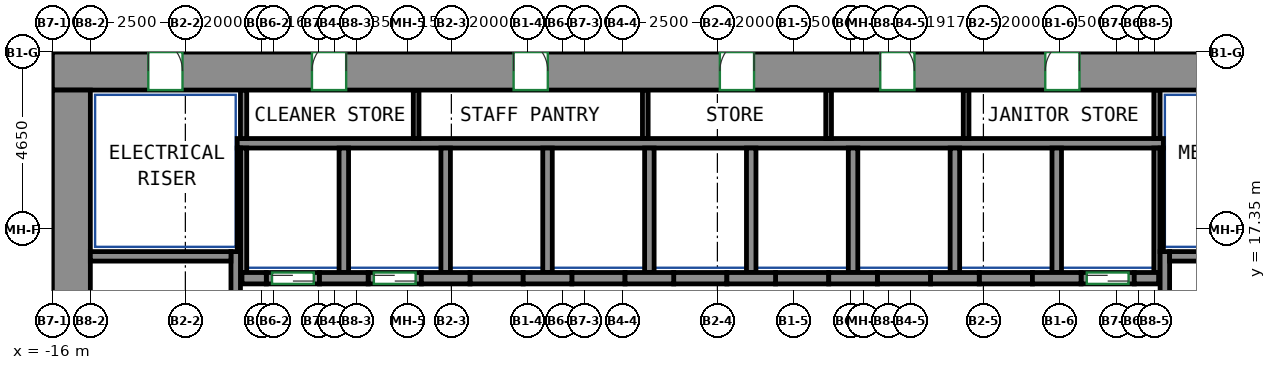
"""IFC4 building model, lengths in metres.
Left out: names, types, materials, properties, quantities, classifications, styles, units other than length and angle.
Written with IfcOpenShell. Run it as: python <this file> out.ifc"""

import sys

from ifc_helpers import new_model, si_unit, direction, frame, frame_2d, origin, place, context, subcontext, project, spatial, rectangle, extrude, source, transform, mapped, element, fill, save


model = new_model("IFC4")
c1 = context("Model", 3, precision=1e-05, world=origin(), true_north=direction((0.0, 1.0)))
c2 = subcontext(c1, "Body", "Model", "MODEL_VIEW")
j1 = project(units=[si_unit("LENGTHUNIT", "METRE"), si_unit("PLANEANGLEUNIT", "RADIAN")], contexts=[c1])
p1 = place(None, origin())
s1 = spatial("IfcSite", under=j1, at=p1, CompositionType="ELEMENT")
p2 = place(p1, origin())
s2 = spatial("IfcBuilding", under=s1, at=p2, CompositionType="ELEMENT")
p3 = place(p2, frame((0.0, 0.0, 59.0)))
s3 = spatial("IfcBuildingStorey", under=s2, at=p3, CompositionType="ELEMENT", Elevation=59.0)
m1 = source(origin(), c2, "Body", "SweptSolid", [
    extrude(rectangle(XDim=34.1, YDim=1.0, at=frame_2d((17.05, 0.0))), origin(), (0.0, 0.0, 1.0), 3.8),
])
p4 = place(p3, frame((-16.0, 21.5, 0.0), z_axis=(0.0, 0.0, 1.0), x_axis=(1.0, 0.0, 0.0)))
e1 = element("IfcWall", 1, at=p4, inside=s3, PredefinedType="SHEAR", context=c2, shape_type="MappedRepresentation", body=[
    mapped(m1, transform((0.0, 0.0, 0.0))),
])
p5 = place(p4, frame((6.831, 0.0, 0.0)))
e2 = element("IfcOpeningElement", 2, at=p5, cuts=e1, PredefinedType="OPENING", context=c2, shape_type="SweptSolid", body=[
    extrude(rectangle(XDim=0.9, YDim=2.1, at=frame_2d((0.45, 1.05))), frame((0.0, 0.51, 0.0), z_axis=(0.0, -1.0, 0.0), x_axis=(1.0, 0.0, 0.0)), (0.0, 0.0, 1.0), 1.02),
])
p6 = place(p4, frame((12.138, 0.0, 0.0)))
e3 = element("IfcOpeningElement", 3, at=p6, cuts=e1, PredefinedType="OPENING", context=c2, shape_type="SweptSolid", body=[
    extrude(rectangle(XDim=0.9, YDim=2.1, at=frame_2d((0.45, 1.05))), frame((0.0, 0.51, 0.0), z_axis=(0.0, -1.0, 0.0), x_axis=(1.0, 0.0, 0.0)), (0.0, 0.0, 1.0), 1.02),
])
p7 = place(p4, frame((17.565, 0.0, 0.0)))
e4 = element("IfcOpeningElement", 4, at=p7, cuts=e1, PredefinedType="OPENING", context=c2, shape_type="SweptSolid", body=[
    extrude(rectangle(XDim=0.9, YDim=2.1, at=frame_2d((0.45, 1.05))), frame((0.0, 0.51, 0.0), z_axis=(0.0, -1.0, 0.0), x_axis=(1.0, 0.0, 0.0)), (0.0, 0.0, 1.0), 1.02),
])
p8 = place(p4, frame((21.786, 0.0, 0.0)))
e5 = element("IfcOpeningElement", 5, at=p8, cuts=e1, PredefinedType="OPENING", context=c2, shape_type="SweptSolid", body=[
    extrude(rectangle(XDim=0.9, YDim=2.1, at=frame_2d((0.45, 1.05))), frame((0.0, 0.51, 0.0), z_axis=(0.0, -1.0, 0.0), x_axis=(1.0, 0.0, 0.0)), (0.0, 0.0, 1.0), 1.02),
])
p9 = place(p4, frame((26.127, 0.0, 0.0)))
e6 = element("IfcOpeningElement", 6, at=p9, cuts=e1, PredefinedType="OPENING", context=c2, shape_type="SweptSolid", body=[
    extrude(rectangle(XDim=0.9, YDim=2.1, at=frame_2d((0.45, 1.05))), frame((0.0, 0.51, 0.0), z_axis=(0.0, -1.0, 0.0), x_axis=(1.0, 0.0, 0.0)), (0.0, 0.0, 1.0), 1.02),
])
p10 = place(p4, frame((2.525, 0.0, 0.0)))
e7 = element("IfcOpeningElement", 7, at=p10, cuts=e1, PredefinedType="OPENING", context=c2, shape_type="SweptSolid", body=[
    extrude(rectangle(XDim=0.9, YDim=2.1, at=frame_2d((0.45, 1.05))), frame((0.0, 0.51, 0.0), z_axis=(0.0, -1.0, 0.0), x_axis=(1.0, 0.0, 0.0)), (0.0, 0.0, 1.0), 1.02),
])
p11 = place(p4, frame((30.675, 0.0, 0.0)))
e8 = element("IfcOpeningElement", 8, at=p11, cuts=e1, PredefinedType="OPENING", context=c2, shape_type="SweptSolid", body=[
    extrude(rectangle(XDim=0.9, YDim=2.1, at=frame_2d((0.45, 1.05))), frame((0.0, 0.51, 0.0), z_axis=(0.0, -1.0, 0.0), x_axis=(1.0, 0.0, 0.0)), (0.0, 0.0, 1.0), 1.02),
])
m2 = source(origin(), c2, "Body", "SweptSolid", [
    extrude(rectangle(XDim=12.0, YDim=1.0, at=frame_2d((6.0, 0.0))), origin(), (0.0, 0.0, 1.0), 3.8),
])
p12 = place(p3, frame((-15.5, 9.0, 0.0), z_axis=(0.0, 0.0, 1.0), x_axis=(0.0, 1.0, 0.0)))
e9 = element("IfcWall", 9, at=p12, inside=s3, PredefinedType="SHEAR", context=c2, shape_type="MappedRepresentation", body=[
    mapped(m2, transform((0.0, 0.0, 0.0))),
])
m3 = source(origin(), c2, "Body", "SweptSolid", [
    extrude(rectangle(XDim=7.75, YDim=0.25, at=frame_2d((3.875, 0.0))), origin(), (0.0, 0.0, 1.0), 3.8),
])
p13 = place(p3, frame((-11.175, 9.0, 0.0), z_axis=(0.0, 0.0, 1.0), x_axis=(0.0, 1.0, 0.0)))
e10 = element("IfcWall", 10, at=p13, inside=s3, PredefinedType="SHEAR", context=c2, shape_type="MappedRepresentation", body=[
    mapped(m3, transform((0.0, 0.0, 0.0))),
])
m4 = source(origin(), c2, "Body", "SweptSolid", [
    extrude(rectangle(XDim=3.7, YDim=0.25, at=frame_2d((1.85, 0.0))), origin(), (0.0, 0.0, 1.0), 3.8),
])
p14 = place(p3, frame((-15.0, 16.625, 0.0), z_axis=(0.0, 0.0, 1.0), x_axis=(1.0, 0.0, 0.0)))
e11 = element("IfcWall", 11, at=p14, inside=s3, PredefinedType="SHEAR", context=c2, shape_type="MappedRepresentation", body=[
    mapped(m4, transform((0.0, 0.0, 0.0))),
])
p15 = place(p3, frame((13.275, 9.0, 0.0), z_axis=(0.0, 0.0, 1.0), x_axis=(0.0, 1.0, 0.0)))
e12 = element("IfcWall", 12, at=p15, inside=s3, PredefinedType="SHEAR", context=c2, shape_type="MappedRepresentation", body=[
    mapped(m3, transform((0.0, 0.0, 0.0))),
])
m5 = source(origin(), c2, "Body", "SweptSolid", [
    extrude(rectangle(XDim=3.7, YDim=0.25, at=frame_2d((1.85, 0.0))), origin(), (0.0, 0.0, 1.0), 3.8),
])
p16 = place(p3, frame((13.4, 16.625, 0.0), z_axis=(0.0, 0.0, 1.0), x_axis=(1.0, 0.0, 0.0)))
e13 = element("IfcWall", 13, at=p16, inside=s3, PredefinedType="SHEAR", context=c2, shape_type="MappedRepresentation", body=[
    mapped(m5, transform((0.0, 0.0, 0.0))),
])
m6 = source(origin(), c2, "Body", "SweptSolid", [
    extrude(rectangle(XDim=0.64, YDim=0.3, at=frame_2d((0.32, 0.0))), origin(), (0.0, 0.0, 1.0), 3.8),
])
p17 = place(p3, frame((-11.01, 16.05, 0.0), z_axis=(0.0, 0.0, 1.0), x_axis=(1.0, 0.0, 0.0)))
e14 = element("IfcWall", 14, at=p17, inside=s3, PredefinedType="SHEAR", context=c2, shape_type="MappedRepresentation", body=[
    mapped(m6, transform((0.0, 0.0, 0.0))),
])
m7 = source(origin(), c2, "Body", "SweptSolid", [
    extrude(rectangle(XDim=1.28, YDim=0.3, at=frame_2d((0.64, 0.0))), origin(), (0.0, 0.0, 1.0), 3.8),
])
for number, where, z_axis, x_axis in (
    (15, (-8.97, 16.05, 0.0), (0.0, 0.0, 1.0), (1.0, 0.0, 0.0)),
    (16, (-6.29, 16.05, 0.0), (0.0, 0.0, 1.0), (1.0, 0.0, 0.0)),
    (17, (-3.61, 16.05, 0.0), (0.0, 0.0, 1.0), (1.0, 0.0, 0.0)),
    (18, (-0.93, 16.05, 0.0), (0.0, 0.0, 1.0), (1.0, 0.0, 0.0)),
    (19, (1.75, 16.05, 0.0), (0.0, 0.0, 1.0), (1.0, 0.0, 0.0)),
    (20, (4.43, 16.05, 0.0), (0.0, 0.0, 1.0), (1.0, 0.0, 0.0)),
):
    element("IfcWall", number, at=place(p3, frame(where, z_axis=z_axis, x_axis=x_axis)), inside=s3, PredefinedType="SHEAR", context=c2, shape_type="MappedRepresentation", body=[
        mapped(m7, transform((0.0, 0.0, 0.0))),
    ])
m8 = source(origin(), c2, "Body", "SweptSolid", [
    extrude(rectangle(XDim=1.28, YDim=0.3, at=frame_2d((0.64, 0.0))), origin(), (0.0, 0.0, 1.0), 3.8),
])
p18 = place(p3, frame((7.11, 16.05, 0.0), z_axis=(0.0, 0.0, 1.0), x_axis=(1.0, 0.0, 0.0)))
e21 = element("IfcWall", 21, at=p18, inside=s3, PredefinedType="SHEAR", context=c2, shape_type="MappedRepresentation", body=[
    mapped(m8, transform((0.0, 0.0, 0.0))),
])
p19 = place(p3, frame((9.79, 16.05, 0.0), z_axis=(0.0, 0.0, 1.0), x_axis=(1.0, 0.0, 0.0)))
e22 = element("IfcWall", 22, at=p19, inside=s3, PredefinedType="SHEAR", context=c2, shape_type="MappedRepresentation", body=[
    mapped(m7, transform((0.0, 0.0, 0.0))),
])
m9 = source(origin(), c2, "Body", "SweptSolid", [
    extrude(rectangle(XDim=0.64, YDim=0.3, at=frame_2d((0.32, 0.0))), origin(), (0.0, 0.0, 1.0), 3.8),
])
p20 = place(p3, frame((12.47, 16.05, 0.0), z_axis=(0.0, 0.0, 1.0), x_axis=(1.0, 0.0, 0.0)))
e23 = element("IfcWall", 23, at=p20, inside=s3, PredefinedType="SHEAR", context=c2, shape_type="MappedRepresentation", body=[
    mapped(m9, transform((0.0, 0.0, 0.0))),
])
m10 = source(origin(), c2, "Body", "SweptSolid", [
    extrude(rectangle(XDim=1.4, YDim=0.3, at=frame_2d((0.7, 0.0))), origin(), (0.0, 0.0, 1.0), 3.8),
])
p21 = place(p3, frame((11.07, 16.05, 0.0), z_axis=(0.0, 0.0, 1.0), x_axis=(1.0, 0.0, 0.0)))
e24 = element("IfcWall", 24, at=p21, inside=s3, PredefinedType="PARTITIONING", context=c2, shape_type="MappedRepresentation", body=[
    mapped(m10, transform((0.0, 0.0, 0.0))),
])
p22 = place(p21, frame((0.15, 0.0, 0.0)))
e25 = element("IfcOpeningElement", 25, at=p22, cuts=e24, PredefinedType="OPENING", context=c2, shape_type="SweptSolid", body=[
    extrude(rectangle(XDim=1.1, YDim=2.1, at=frame_2d((0.55, 1.05))), frame((0.0, 0.16, 0.0), z_axis=(0.0, -1.0, 0.0), x_axis=(1.0, 0.0, 0.0)), (0.0, 0.0, 1.0), 0.32),
])
m11 = source(origin(), c2, "Body", "SweptSolid", [
    extrude(rectangle(XDim=1.4, YDim=0.3, at=frame_2d((0.7, 0.0))), origin(), (0.0, 0.0, 1.0), 3.8),
])
p23 = place(p3, frame((-10.37, 16.05, 0.0), z_axis=(0.0, 0.0, 1.0), x_axis=(1.0, 0.0, 0.0)))
e26 = element("IfcWall", 26, at=p23, inside=s3, PredefinedType="PARTITIONING", context=c2, shape_type="MappedRepresentation", body=[
    mapped(m11, transform((0.0, 0.0, 0.0))),
])
p24 = place(p23, frame((0.15, 0.0, 0.0)))
e27 = element("IfcOpeningElement", 27, at=p24, cuts=e26, PredefinedType="OPENING", context=c2, shape_type="SweptSolid", body=[
    extrude(rectangle(XDim=1.1, YDim=2.1, at=frame_2d((0.55, 1.05))), frame((0.0, 0.16, 0.0), z_axis=(0.0, -1.0, 0.0), x_axis=(1.0, 0.0, 0.0)), (0.0, 0.0, 1.0), 0.32),
])
p25 = place(p3, frame((-7.69, 16.05, 0.0), z_axis=(0.0, 0.0, 1.0), x_axis=(1.0, 0.0, 0.0)))
e28 = element("IfcWall", 28, at=p25, inside=s3, PredefinedType="PARTITIONING", context=c2, shape_type="MappedRepresentation", body=[
    mapped(m10, transform((0.0, 0.0, 0.0))),
])
p26 = place(p25, frame((0.15, 0.0, 0.0)))
e29 = element("IfcOpeningElement", 29, at=p26, cuts=e28, PredefinedType="OPENING", context=c2, shape_type="SweptSolid", body=[
    extrude(rectangle(XDim=1.1, YDim=2.1, at=frame_2d((0.55, 1.05))), frame((0.0, 0.16, 0.0), z_axis=(0.0, -1.0, 0.0), x_axis=(1.0, 0.0, 0.0)), (0.0, 0.0, 1.0), 0.32),
])
p27 = place(p3, frame((-5.01, 16.05, 0.0), z_axis=(0.0, 0.0, 1.0), x_axis=(1.0, 0.0, 0.0)))
e30 = element("IfcWall", 30, at=p27, inside=s3, PredefinedType="PARTITIONING", context=c2, shape_type="MappedRepresentation", body=[
    mapped(m10, transform((0.0, 0.0, 0.0))),
])
p28 = place(p3, frame((-2.33, 16.05, 0.0), z_axis=(0.0, 0.0, 1.0), x_axis=(1.0, 0.0, 0.0)))
e31 = element("IfcWall", 31, at=p28, inside=s3, PredefinedType="PARTITIONING", context=c2, shape_type="MappedRepresentation", body=[
    mapped(m11, transform((0.0, 0.0, 0.0))),
])
for number, where, z_axis, x_axis in (
    (32, (0.35, 16.05, 0.0), (0.0, 0.0, 1.0), (1.0, 0.0, 0.0)),
    (33, (3.03, 16.05, 0.0), (0.0, 0.0, 1.0), (1.0, 0.0, 0.0)),
):
    element("IfcWall", number, at=place(p3, frame(where, z_axis=z_axis, x_axis=x_axis)), inside=s3, PredefinedType="PARTITIONING", context=c2, shape_type="MappedRepresentation", body=[
        mapped(m10, transform((0.0, 0.0, 0.0))),
    ])
for number, where, z_axis, x_axis in (
    (34, (5.71, 16.05, 0.0), (0.0, 0.0, 1.0), (1.0, 0.0, 0.0)),
    (35, (8.39, 16.05, 0.0), (0.0, 0.0, 1.0), (1.0, 0.0, 0.0)),
):
    element("IfcWall", number, at=place(p3, frame(where, z_axis=z_axis, x_axis=x_axis)), inside=s3, PredefinedType="PARTITIONING", context=c2, shape_type="MappedRepresentation", body=[
        mapped(m11, transform((0.0, 0.0, 0.0))),
    ])
m12 = source(origin(), c2, "Body", "SweptSolid", [
    extrude(rectangle(XDim=24.37, YDim=0.25, at=frame_2d((12.185, 0.0))), origin(), (0.0, 0.0, 1.0), 3.8),
])
p29 = place(p3, frame((-11.135, 19.6, 0.0), z_axis=(0.0, 0.0, 1.0), x_axis=(1.0, 0.0, 0.0)))
e36 = element("IfcWall", 36, at=p29, inside=s3, PredefinedType="PARTITIONING", context=c2, shape_type="MappedRepresentation", body=[
    mapped(m12, transform((0.0, 0.0, 0.0))),
])
m13 = source(origin(), c2, "Body", "SweptSolid", [
    extrude(rectangle(XDim=3.275, YDim=0.165, at=frame_2d((1.638, 0.0))), origin(), (0.0, 0.0, 1.0), 3.8),
])
p30 = place(p3, frame((13.067, 16.2, 0.0), z_axis=(0.0, 0.0, 1.0), x_axis=(0.0, 1.0, 0.0)))
e37 = element("IfcWall", 37, at=p30, inside=s3, PredefinedType="PARTITIONING", context=c2, shape_type="MappedRepresentation", body=[
    mapped(m13, transform((0.0, 0.0, 0.0))),
])
m14 = source(origin(), c2, "Body", "SweptSolid", [
    extrude(rectangle(XDim=1.275, YDim=0.165, at=frame_2d((0.637, 0.0))), origin(), (0.0, 0.0, 1.0), 3.8),
])
p31 = place(p3, frame((13.067, 19.725, 0.0), z_axis=(0.0, 0.0, 1.0), x_axis=(0.0, 1.0, 0.0)))
e38 = element("IfcWall", 38, at=p31, inside=s3, PredefinedType="PARTITIONING", context=c2, shape_type="MappedRepresentation", body=[
    mapped(m14, transform((0.0, 0.0, 0.0))),
])
p32 = place(p3, frame((-10.968, 16.2, 0.0), z_axis=(0.0, 0.0, 1.0), x_axis=(0.0, 1.0, 0.0)))
e39 = element("IfcWall", 39, at=p32, inside=s3, PredefinedType="PARTITIONING", context=c2, shape_type="MappedRepresentation", body=[
    mapped(m13, transform((0.0, 0.0, 0.0))),
])
p33 = place(p3, frame((-10.968, 19.725, 0.0), z_axis=(0.0, 0.0, 1.0), x_axis=(0.0, 1.0, 0.0)))
e40 = element("IfcWall", 40, at=p33, inside=s3, PredefinedType="PARTITIONING", context=c2, shape_type="MappedRepresentation", body=[
    mapped(m14, transform((0.0, 0.0, 0.0))),
])
m15 = source(origin(), c2, "Body", "SweptSolid", [
    extrude(rectangle(XDim=3.275, YDim=0.25, at=frame_2d((1.638, 0.0))), origin(), (0.0, 0.0, 1.0), 3.8),
])
p34 = place(p3, frame((10.43, 16.2, 0.0), z_axis=(0.0, 0.0, 1.0), x_axis=(0.0, 1.0, 0.0)))
e41 = element("IfcWall", 41, at=p34, inside=s3, PredefinedType="PARTITIONING", context=c2, shape_type="MappedRepresentation", body=[
    mapped(m15, transform((0.0, 0.0, 0.0))),
])
m16 = source(origin(), c2, "Body", "SweptSolid", [
    extrude(rectangle(XDim=2.725, YDim=0.085, at=frame_2d((1.363, 0.0))), origin(), (0.0, 0.0, 1.0), 3.8),
])
p35 = place(p3, frame((13.192, 16.75, 0.0), z_axis=(0.0, 0.0, 1.0), x_axis=(0.0, 1.0, 0.0)))
e42 = element("IfcWall", 42, at=p35, inside=s3, PredefinedType="PARTITIONING", context=c2, shape_type="MappedRepresentation", body=[
    mapped(m16, transform((0.0, 0.0, 0.0))),
])
for number, where, z_axis, x_axis in (
    (43, (2.39, 16.2, 0.0), (0.0, 0.0, 1.0), (0.0, 1.0, 0.0)),
    (44, (5.07, 16.2, 0.0), (0.0, 0.0, 1.0), (0.0, 1.0, 0.0)),
    (45, (7.75, 16.2, 0.0), (0.0, 0.0, 1.0), (0.0, 1.0, 0.0)),
    (46, (-0.29, 16.2, 0.0), (0.0, 0.0, 1.0), (0.0, 1.0, 0.0)),
):
    element("IfcWall", number, at=place(p3, frame(where, z_axis=z_axis, x_axis=x_axis)), inside=s3, PredefinedType="PARTITIONING", context=c2, shape_type="MappedRepresentation", body=[
        mapped(m15, transform((0.0, 0.0, 0.0))),
    ])
p36 = place(p3, frame((-11.093, 16.75, 0.0), z_axis=(0.0, 0.0, 1.0), x_axis=(0.0, 1.0, 0.0)))
e47 = element("IfcWall", 47, at=p36, inside=s3, PredefinedType="PARTITIONING", context=c2, shape_type="MappedRepresentation", body=[
    mapped(m16, transform((0.0, 0.0, 0.0))),
])
for number, where, z_axis, x_axis in (
    (48, (-2.97, 16.2, 0.0), (0.0, 0.0, 1.0), (0.0, 1.0, 0.0)),
    (49, (-5.65, 16.2, 0.0), (0.0, 0.0, 1.0), (0.0, 1.0, 0.0)),
    (50, (-8.33, 16.2, 0.0), (0.0, 0.0, 1.0), (0.0, 1.0, 0.0)),
):
    element("IfcWall", number, at=place(p3, frame(where, z_axis=z_axis, x_axis=x_axis)), inside=s3, PredefinedType="PARTITIONING", context=c2, shape_type="MappedRepresentation", body=[
        mapped(m15, transform((0.0, 0.0, 0.0))),
    ])
m17 = source(origin(), c2, "Body", "SweptSolid", [
    extrude(rectangle(XDim=1.275, YDim=0.15, at=frame_2d((0.637, 0.0))), origin(), (0.0, 0.0, 1.0), 3.8),
])
for number, where, z_axis, x_axis in (
    (51, (-6.427, 19.725, 0.0), (0.0, 0.0, 1.0), (0.0, 1.0, 0.0)),
    (52, (-0.397, 19.725, 0.0), (0.0, 0.0, 1.0), (0.0, 1.0, 0.0)),
    (53, (4.427, 19.725, 0.0), (0.0, 0.0, 1.0), (0.0, 1.0, 0.0)),
    (54, (8.045, 19.725, 0.0), (0.0, 0.0, 1.0), (0.0, 1.0, 0.0)),
):
    element("IfcWall", number, at=place(p3, frame(where, z_axis=z_axis, x_axis=x_axis)), inside=s3, PredefinedType="PARTITIONING", context=c2, shape_type="MappedRepresentation", body=[
        mapped(m17, transform((0.0, 0.0, 0.0))),
    ])
p37 = place(p22, origin())
e55 = element("IfcDoor", 55, at=p37, inside=s3, OperationType="DOUBLE_DOOR_SLIDING", PredefinedType="DOOR", context=c2, shape_type="SweptSolid", body=[
    extrude(rectangle(XDim=1.1, YDim=2.1, at=frame_2d((0.55, 1.05))), frame((0.0, 0.025, 0.0), z_axis=(0.0, -1.0, 0.0), x_axis=(1.0, 0.0, 0.0)), (0.0, 0.0, 1.0), 0.05),
])
fill(e25, e55)
p38 = place(p24, origin())
e56 = element("IfcDoor", 56, at=p38, inside=s3, OperationType="DOUBLE_DOOR_SLIDING", PredefinedType="DOOR", context=c2, shape_type="SweptSolid", body=[
    extrude(rectangle(XDim=1.1, YDim=2.1, at=frame_2d((0.55, 1.05))), frame((0.0, 0.025, 0.0), z_axis=(0.0, -1.0, 0.0), x_axis=(1.0, 0.0, 0.0)), (0.0, 0.0, 1.0), 0.05),
])
fill(e27, e56)
p39 = place(p26, origin())
e57 = element("IfcDoor", 57, at=p39, inside=s3, OperationType="DOUBLE_DOOR_SLIDING", PredefinedType="DOOR", context=c2, shape_type="SweptSolid", body=[
    extrude(rectangle(XDim=1.1, YDim=2.1, at=frame_2d((0.55, 1.05))), frame((0.0, 0.025, 0.0), z_axis=(0.0, -1.0, 0.0), x_axis=(1.0, 0.0, 0.0)), (0.0, 0.0, 1.0), 0.05),
])
fill(e29, e57)
p40 = place(p5, origin())
e58 = element("IfcDoor", 58, at=p40, inside=s3, OperationType="SINGLE_SWING_RIGHT", PredefinedType="DOOR", context=c2, shape_type="SweptSolid", body=[
    extrude(rectangle(XDim=0.9, YDim=2.1, at=frame_2d((0.45, 1.05))), frame((0.0, -0.355, 0.0), z_axis=(0.0, -1.0, 0.0), x_axis=(1.0, 0.0, 0.0)), (0.0, 0.0, 1.0), 0.05),
])
fill(e2, e58)
p41 = place(p6, origin())
e59 = element("IfcDoor", 59, at=p41, inside=s3, OperationType="SINGLE_SWING_LEFT", PredefinedType="DOOR", context=c2, shape_type="SweptSolid", body=[
    extrude(rectangle(XDim=0.9, YDim=2.1, at=frame_2d((0.45, 1.05))), frame((0.0, -0.355, 0.0), z_axis=(0.0, -1.0, 0.0), x_axis=(1.0, 0.0, 0.0)), (0.0, 0.0, 1.0), 0.05),
])
fill(e3, e59)
p42 = place(p7, origin())
e60 = element("IfcDoor", 60, at=p42, inside=s3, OperationType="SINGLE_SWING_RIGHT", PredefinedType="DOOR", context=c2, shape_type="SweptSolid", body=[
    extrude(rectangle(XDim=0.9, YDim=2.1, at=frame_2d((0.45, 1.05))), frame((0.0, -0.355, 0.0), z_axis=(0.0, -1.0, 0.0), x_axis=(1.0, 0.0, 0.0)), (0.0, 0.0, 1.0), 0.05),
])
fill(e4, e60)
p43 = place(p8, origin())
e61 = element("IfcDoor", 61, at=p43, inside=s3, OperationType="SINGLE_SWING_LEFT", PredefinedType="DOOR", context=c2, shape_type="SweptSolid", body=[
    extrude(rectangle(XDim=0.9, YDim=2.1, at=frame_2d((0.45, 1.05))), frame((0.0, -0.355, 0.0), z_axis=(0.0, -1.0, 0.0), x_axis=(1.0, 0.0, 0.0)), (0.0, 0.0, 1.0), 0.05),
])
fill(e5, e61)
p44 = place(p9, origin())
e62 = element("IfcDoor", 62, at=p44, inside=s3, OperationType="SINGLE_SWING_RIGHT", PredefinedType="DOOR", context=c2, shape_type="SweptSolid", body=[
    extrude(rectangle(XDim=0.9, YDim=2.1, at=frame_2d((0.45, 1.05))), frame((0.0, -0.355, 0.0), z_axis=(0.0, -1.0, 0.0), x_axis=(1.0, 0.0, 0.0)), (0.0, 0.0, 1.0), 0.05),
])
fill(e6, e62)
p45 = place(p10, origin())
e63 = element("IfcDoor", 63, at=p45, inside=s3, OperationType="SINGLE_SWING_LEFT", PredefinedType="DOOR", context=c2, shape_type="SweptSolid", body=[
    extrude(rectangle(XDim=0.9, YDim=2.1, at=frame_2d((0.45, 1.05))), frame((0.0, -0.355, 0.0), z_axis=(0.0, -1.0, 0.0), x_axis=(1.0, 0.0, 0.0)), (0.0, 0.0, 1.0), 0.05),
])
fill(e7, e63)
save(model, sys.argv[1])
